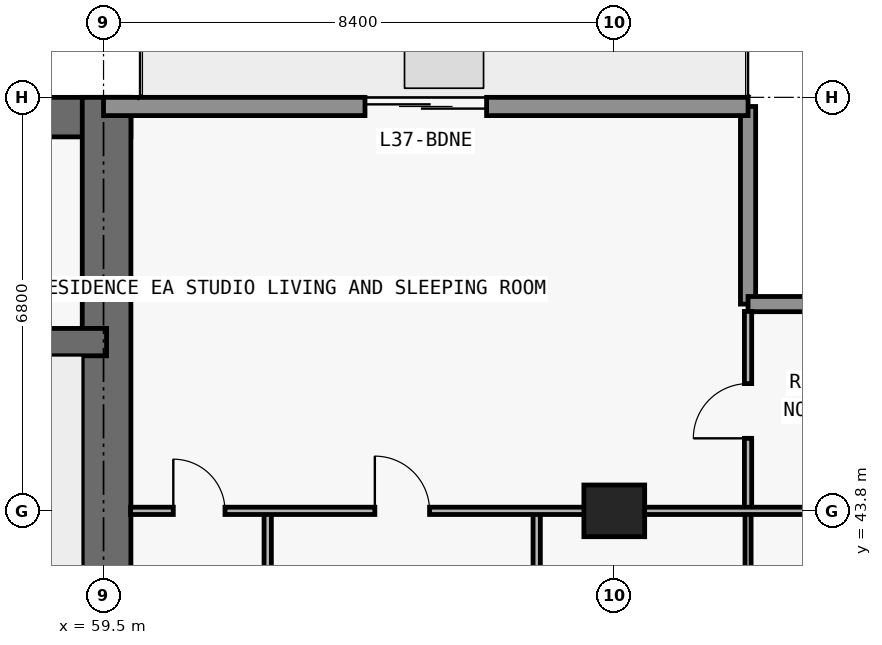
"""IFC4 building model, lengths in metres.
Left out: names, types, materials, properties, quantities, classifications, styles, units other than length and angle.
Written with IfcOpenShell. Run it as: python <this file> out.ifc"""

import sys

from ifc_helpers import new_model, si_unit, direction, frame, frame_2d, origin, origin_2d, place, context, subcontext, project, spatial, rectangle, extrude, element, fill, save


model = new_model("IFC4")
c1 = context("Model", 3, precision=1e-05, world=origin(), true_north=direction((0.0, 1.0)))
c2 = subcontext(c1, "Body", "Model", "MODEL_VIEW")
j1 = project(units=[si_unit("LENGTHUNIT", "METRE"), si_unit("PLANEANGLEUNIT", "RADIAN")], contexts=[c1])
p1 = place(None, origin())
s1 = spatial("IfcSite", under=j1, at=p1, CompositionType="ELEMENT")
p2 = place(p1, origin())
s2 = spatial("IfcBuilding", under=s1, at=p2, CompositionType="ELEMENT")
p3 = place(p2, frame((0.0, 0.0, 135.6)))
s3 = spatial("IfcBuildingStorey", under=s2, at=p3, CompositionType="ELEMENT", Elevation=135.6)
p4 = place(p3, frame((67.9, 43.8, 0.0), z_axis=(0.0, 0.0, 1.0), x_axis=(1.0, 0.0, 0.0)))
e1 = element("IfcColumn", 1, at=p4, inside=s3, PredefinedType="COLUMN", context=c2, shape_type="SweptSolid", body=[
    extrude(rectangle(XDim=1.0, YDim=0.85, at=origin_2d()), origin(), (0.0, 0.0, 1.0), 3.05),
])
p5 = place(p3, frame((17.85, 50.275, 0.0), z_axis=(0.0, 0.0, 1.0), x_axis=(1.0, 0.0, 0.0)))
e2 = element("IfcWall", 2, at=p5, inside=s3, PredefinedType="SHEAR", context=c2, shape_type="SweptSolid", body=[
    extrude(rectangle(XDim=42.1, YDim=0.65, at=frame_2d((21.05, 0.0))), origin(), (0.0, 0.0, 1.0), 3.05),
])
p6 = place(p3, frame((59.55, 36.55, 0.0), z_axis=(0.0, 0.0, 1.0), x_axis=(0.0, 1.0, 0.0)))
e3 = element("IfcWall", 3, at=p6, inside=s3, PredefinedType="SHEAR", context=c2, shape_type="SweptSolid", body=[
    extrude(rectangle(XDim=14.05, YDim=0.8, at=frame_2d((7.025, 0.0))), origin(), (0.0, 0.0, 1.0), 3.05),
])
p7 = place(p3, frame((18.25, 46.575, 0.0), z_axis=(0.0, 0.0, 1.0), x_axis=(1.0, 0.0, 0.0)))
e4 = element("IfcWall", 4, at=p7, inside=s3, PredefinedType="SHEAR", context=c2, shape_type="SweptSolid", body=[
    extrude(rectangle(XDim=41.3, YDim=0.45, at=frame_2d((20.65, 0.0))), origin(), (0.0, 0.0, 1.0), 3.05),
])
p8 = place(p7, frame((7.625, 0.0, 0.0)))
e5 = element("IfcOpeningElement", 5, at=p8, cuts=e4, PredefinedType="OPENING", context=c2, shape_type="SweptSolid", body=[
    extrude(rectangle(XDim=1.05, YDim=2.15, at=frame_2d((0.525, 1.075))), frame((0.0, 0.235, 0.0), z_axis=(0.0, -1.0, 0.0), x_axis=(1.0, 0.0, 0.0)), (0.0, 0.0, 1.0), 0.47),
])
p9 = place(p7, frame((32.675, 0.0, 0.0)))
e6 = element("IfcOpeningElement", 6, at=p9, cuts=e4, PredefinedType="OPENING", context=c2, shape_type="SweptSolid", body=[
    extrude(rectangle(XDim=1.05, YDim=2.15, at=frame_2d((0.525, 1.075))), frame((0.0, 0.235, 0.0), z_axis=(0.0, -1.0, 0.0), x_axis=(1.0, 0.0, 0.0)), (0.0, 0.0, 1.0), 0.47),
])
p10 = place(p3, frame((70.1, 50.45, 0.0), z_axis=(0.0, 0.0, 1.0), x_axis=(0.0, -1.0, 0.0)))
e7 = element("IfcWall", 7, at=p10, inside=s3, PredefinedType="ELEMENTEDWALL", context=c2, shape_type="SweptSolid", body=[
    extrude(rectangle(XDim=3.25, YDim=0.25, at=frame_2d((1.625, 0.0))), origin(), (0.0, 0.0, 1.0), 3.05),
])
p11 = place(p3, frame((70.1, 47.2, 0.0), z_axis=(0.0, 0.0, 1.0), x_axis=(1.0, 0.0, 0.0)))
e8 = element("IfcWall", 8, at=p11, inside=s3, PredefinedType="ELEMENTEDWALL", context=c2, shape_type="SweptSolid", body=[
    extrude(rectangle(XDim=3.65, YDim=0.25, at=frame_2d((1.825, 0.0))), origin(), (0.0, 0.0, 1.0), 3.05),
])
p12 = place(p3, frame((59.5, 50.45, 0.0), z_axis=(0.0, 0.0, 1.0), x_axis=(1.0, 0.0, 0.0)))
e9 = element("IfcWall", 9, at=p12, inside=s3, PredefinedType="STANDARD", context=c2, shape_type="SweptSolid", body=[
    extrude(rectangle(XDim=10.6, YDim=0.3, at=frame_2d((5.3, 0.0))), origin(), (0.0, 0.0, 1.0), 3.05),
])
p13 = place(p12, frame((4.3, 0.0, 0.0)))
e10 = element("IfcOpeningElement", 10, at=p13, cuts=e9, PredefinedType="OPENING", context=c2, shape_type="SweptSolid", body=[
    extrude(rectangle(XDim=2.0, YDim=2.3, at=frame_2d((1.0, 1.15))), frame((0.0, 0.16, 0.0), z_axis=(0.0, -1.0, 0.0), x_axis=(1.0, 0.0, 0.0)), (0.0, 0.0, 1.0), 0.32),
])
p14 = place(p3, frame((62.2, 36.95, 0.0), z_axis=(0.0, 0.0, 1.0), x_axis=(0.0, 1.0, 0.0)))
e11 = element("IfcWall", 11, at=p14, inside=s3, PredefinedType="PARTITIONING", context=c2, shape_type="SweptSolid", body=[
    extrude(rectangle(XDim=6.85, YDim=0.12, at=frame_2d((3.425, 0.0))), origin(), (0.0, 0.0, 1.0), 3.05),
])
p15 = place(p14, frame((1.219, 0.0, 0.0)))
e12 = element("IfcOpeningElement", 12, at=p15, cuts=e11, PredefinedType="OPENING", context=c2, shape_type="SweptSolid", body=[
    extrude(rectangle(XDim=0.85, YDim=2.1, at=frame_2d((0.425, 1.05))), frame((0.0, 0.07, 0.0), z_axis=(0.0, -1.0, 0.0), x_axis=(1.0, 0.0, 0.0)), (0.0, 0.0, 1.0), 0.14),
])
p16 = place(p3, frame((66.624, 36.95, 0.0), z_axis=(0.0, 0.0, 1.0), x_axis=(0.0, 1.0, 0.0)))
e13 = element("IfcWall", 13, at=p16, inside=s3, PredefinedType="PARTITIONING", context=c2, shape_type="SweptSolid", body=[
    extrude(rectangle(XDim=6.85, YDim=0.12, at=frame_2d((3.425, 0.0))), origin(), (0.0, 0.0, 1.0), 3.05),
])
p17 = place(p16, frame((2.975, 0.0, 0.0)))
e14 = element("IfcOpeningElement", 14, at=p17, cuts=e13, PredefinedType="OPENING", context=c2, shape_type="SweptSolid", body=[
    extrude(rectangle(XDim=0.9, YDim=2.15, at=frame_2d((0.45, 1.075))), frame((0.0, 0.07, 0.0), z_axis=(0.0, -1.0, 0.0), x_axis=(1.0, 0.0, 0.0)), (0.0, 0.0, 1.0), 0.14),
])
p18 = place(p3, frame((70.1, 36.955, 0.0), z_axis=(0.0, 0.0, 1.0), x_axis=(0.0, 1.0, 0.0)))
e15 = element("IfcWall", 15, at=p18, inside=s3, PredefinedType="MOVABLE", context=c2, shape_type="SweptSolid", body=[
    extrude(rectangle(XDim=6.845, YDim=0.1, at=frame_2d((3.422, 0.0))), origin(), (0.0, 0.0, 1.0), 3.05),
])
p19 = place(p18, frame((2.972, 0.0, 0.0)))
e16 = element("IfcOpeningElement", 16, at=p19, cuts=e15, PredefinedType="OPENING", context=c2, shape_type="SweptSolid", body=[
    extrude(rectangle(XDim=0.9, YDim=2.15, at=frame_2d((0.45, 1.075))), frame((0.0, 0.06, 0.0), z_axis=(0.0, -1.0, 0.0), x_axis=(1.0, 0.0, 0.0)), (0.0, 0.0, 1.0), 0.12),
])
p20 = place(p3, frame((70.1, 43.805, 0.0), z_axis=(0.0, 0.0, 1.0), x_axis=(0.0, 1.0, 0.0)))
e17 = element("IfcWall", 17, at=p20, inside=s3, PredefinedType="PARTITIONING", context=c2, shape_type="SweptSolid", body=[
    extrude(rectangle(XDim=3.275, YDim=0.12, at=frame_2d((1.638, 0.0))), origin(), (0.0, 0.0, 1.0), 3.05),
])
p21 = place(p20, frame((1.188, 0.0, 0.0)))
e18 = element("IfcOpeningElement", 18, at=p21, cuts=e17, PredefinedType="OPENING", context=c2, shape_type="SweptSolid", body=[
    extrude(rectangle(XDim=0.9, YDim=2.15, at=frame_2d((0.45, 1.075))), frame((0.0, 0.07, 0.0), z_axis=(0.0, -1.0, 0.0), x_axis=(1.0, 0.0, 0.0)), (0.0, 0.0, 1.0), 0.14),
])
p22 = place(p3, frame((59.945, 43.8, 0.0), z_axis=(0.0, 0.0, 1.0), x_axis=(1.0, 0.0, 0.0)))
e19 = element("IfcWall", 19, at=p22, inside=s3, PredefinedType="PARTITIONING", context=c2, shape_type="SweptSolid", body=[
    extrude(rectangle(XDim=13.66, YDim=0.12, at=frame_2d((6.83, 0.0))), origin(), (0.0, 0.0, 1.0), 2.339),
])
p23 = place(p22, frame((4.017, 0.0, 0.0)))
e20 = element("IfcOpeningElement", 20, at=p23, cuts=e19, PredefinedType="OPENING", context=c2, shape_type="SweptSolid", body=[
    extrude(rectangle(XDim=0.9, YDim=2.15, at=frame_2d((0.45, 1.075))), frame((0.0, 0.07, 0.0), z_axis=(0.0, -1.0, 0.0), x_axis=(1.0, 0.0, 0.0)), (0.0, 0.0, 1.0), 0.14),
])
p24 = place(p22, frame((0.702, 0.0, 0.0)))
e21 = element("IfcOpeningElement", 21, at=p24, cuts=e19, PredefinedType="OPENING", context=c2, shape_type="SweptSolid", body=[
    extrude(rectangle(XDim=0.85, YDim=2.1, at=frame_2d((0.425, 1.05))), frame((0.0, 0.07, 0.0), z_axis=(0.0, -1.0, 0.0), x_axis=(1.0, 0.0, 0.0)), (0.0, 0.0, 1.0), 0.14),
])
p25 = place(p13, origin())
e22 = element("IfcDoor", 22, at=p25, inside=s3, OperationType="DOUBLE_DOOR_SLIDING", PredefinedType="DOOR", context=c2, shape_type="SweptSolid", body=[
    extrude(rectangle(XDim=2.0, YDim=2.3, at=frame_2d((1.0, 1.15))), frame((0.0, 0.025, 0.0), z_axis=(0.0, -1.0, 0.0), x_axis=(1.0, 0.0, 0.0)), (0.0, 0.0, 1.0), 0.05),
])
fill(e10, e22)
p26 = place(p23, origin())
e23 = element("IfcDoor", 23, at=p26, inside=s3, OperationType="SINGLE_SWING_LEFT", PredefinedType="DOOR", context=c2, shape_type="SweptSolid", body=[
    extrude(rectangle(XDim=0.9, YDim=2.15, at=frame_2d((0.45, 1.075))), frame((0.0, 0.025, 0.0), z_axis=(0.0, -1.0, 0.0), x_axis=(1.0, 0.0, 0.0)), (0.0, 0.0, 1.0), 0.05),
])
fill(e20, e23)
p27 = place(p24, origin())
e24 = element("IfcDoor", 24, at=p27, inside=s3, OperationType="SINGLE_SWING_LEFT", PredefinedType="DOOR", context=c2, shape_type="SweptSolid", body=[
    extrude(rectangle(XDim=0.85, YDim=2.1, at=frame_2d((0.425, 1.05))), frame((0.0, 0.025, 0.0), z_axis=(0.0, -1.0, 0.0), x_axis=(1.0, 0.0, 0.0)), (0.0, 0.0, 1.0), 0.05),
])
fill(e21, e24)
p28 = place(p21, origin())
e25 = element("IfcDoor", 25, at=p28, inside=s3, OperationType="SINGLE_SWING_LEFT", PredefinedType="DOOR", context=c2, shape_type="SweptSolid", body=[
    extrude(rectangle(XDim=0.9, YDim=2.15, at=frame_2d((0.45, 1.075))), frame((0.0, 0.025, 0.0), z_axis=(0.0, -1.0, 0.0), x_axis=(1.0, 0.0, 0.0)), (0.0, 0.0, 1.0), 0.05),
])
fill(e18, e25)
save(model, sys.argv[1])
